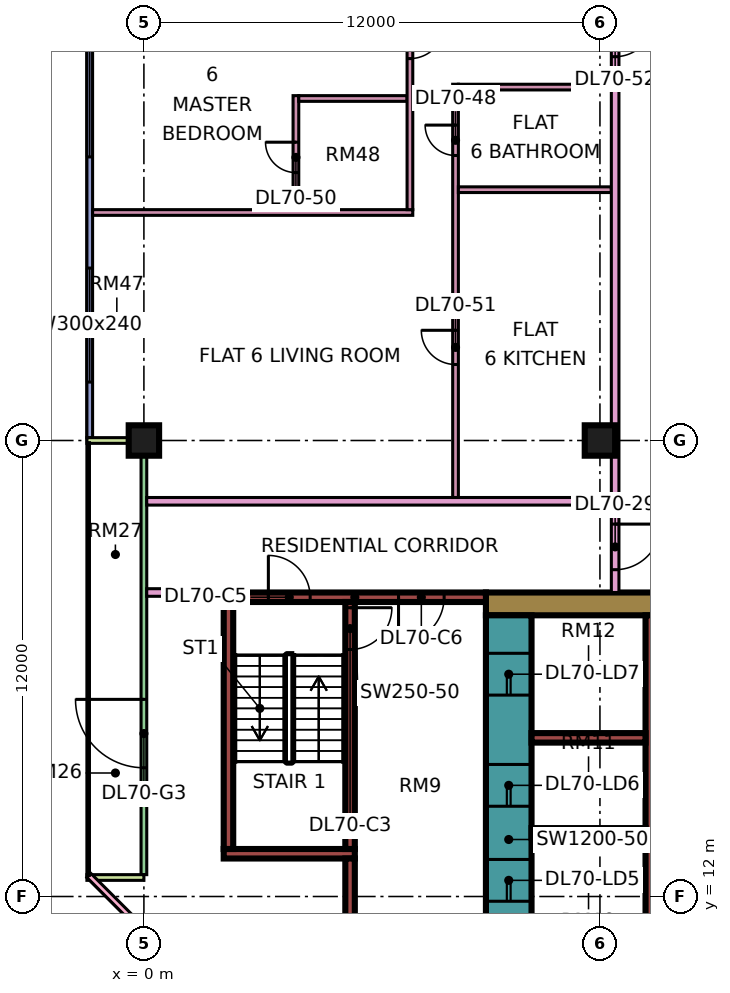
"""IFC4 building model, lengths in metres.
Left out: names, types, materials, properties, quantities, classifications, styles, units other than length and angle.
Written with IfcOpenShell. Run it as: python <this file> out.ifc"""

import sys

from ifc_helpers import new_model, si_unit, direction, frame, frame_2d, origin, origin_2d, place, context, subcontext, project, spatial, rectangle, extrude, element, fill, save


model = new_model("IFC4")
c1 = context("Model", 3, precision=1e-05, world=origin(), true_north=direction((0.0, 1.0)))
c2 = subcontext(c1, "Body", "Model", "MODEL_VIEW")
j1 = project(units=[si_unit("LENGTHUNIT", "METRE"), si_unit("PLANEANGLEUNIT", "RADIAN")], contexts=[c1])
p1 = place(None, origin())
s1 = spatial("IfcSite", under=j1, at=p1, CompositionType="ELEMENT")
p2 = place(p1, origin())
s2 = spatial("IfcBuilding", under=s1, at=p2, CompositionType="ELEMENT")
p3 = place(p2, frame((0.0, 0.0, 299.65)))
s3 = spatial("IfcBuildingStorey", under=s2, at=p3, CompositionType="ELEMENT", Elevation=299.65)
for number, where, z_axis, x_axis in (
    (1, (0.0, 24.0, 0.0), (0.0, 0.0, 1.0), (1.0, 0.0, 0.0)),
    (2, (12.0, 24.0, 0.0), (0.0, 0.0, 1.0), (1.0, 0.0, 0.0)),
):
    element("IfcColumn", number, at=place(p3, frame(where, z_axis=z_axis, x_axis=x_axis)), inside=s3, PredefinedType="COLUMN", context=c2, shape_type="SweptSolid", body=[
        extrude(rectangle(XDim=0.8, YDim=0.8, at=origin_2d()), origin(), (0.0, 0.0, 1.0), 3.75),
    ])
p4 = place(p3, frame((9.0, 19.7, 0.0), z_axis=(0.0, 0.0, 1.0), x_axis=(1.0, 0.0, 0.0)))
e3 = element("IfcWall", 3, at=p4, inside=s3, PredefinedType="SHEAR", context=c2, shape_type="SweptSolid", body=[
    extrude(rectangle(XDim=25.0, YDim=0.6, at=frame_2d((12.5, 0.0))), origin(), (0.0, 0.0, 1.0), 3.75),
])
p5 = place(p4, frame((19.1, 0.0, 0.0)))
e4 = element("IfcOpeningElement", 4, at=p5, cuts=e3, PredefinedType="OPENING", context=c2, shape_type="SweptSolid", body=[
    extrude(rectangle(XDim=1.8, YDim=2.4, at=frame_2d((0.9, 1.2))), frame((0.0, 0.31, 0.0), z_axis=(0.0, -1.0, 0.0), x_axis=(1.0, 0.0, 0.0)), (0.0, 0.0, 1.0), 0.62),
])
p6 = place(p3, frame((9.6, 7.6, 0.0), z_axis=(0.0, 0.0, 1.0), x_axis=(0.0, 1.0, 0.0)))
e5 = element("IfcWall", 5, at=p6, inside=s3, PredefinedType="SHEAR", context=c2, shape_type="SweptSolid", body=[
    extrude(rectangle(XDim=11.8, YDim=1.2, at=frame_2d((5.9, 0.0))), origin(), (0.0, 0.0, 1.0), 3.75),
])
p7 = place(p6, frame((4.275, 0.0, 0.0)))
e6 = element("IfcOpeningElement", 6, at=p7, cuts=e5, PredefinedType="OPENING", context=c2, shape_type="SweptSolid", body=[
    extrude(rectangle(XDim=1.1, YDim=2.2, at=frame_2d((0.55, 1.1))), frame((0.0, 0.61, 0.0), z_axis=(0.0, -1.0, 0.0), x_axis=(1.0, 0.0, 0.0)), (0.0, 0.0, 1.0), 1.22),
])
p8 = place(p6, frame((6.775, 0.0, 0.0)))
e7 = element("IfcOpeningElement", 7, at=p8, cuts=e5, PredefinedType="OPENING", context=c2, shape_type="SweptSolid", body=[
    extrude(rectangle(XDim=1.1, YDim=2.2, at=frame_2d((0.55, 1.1))), frame((0.0, 0.61, 0.0), z_axis=(0.0, -1.0, 0.0), x_axis=(1.0, 0.0, 0.0)), (0.0, 0.0, 1.0), 1.22),
])
p9 = place(p6, frame((9.7, 0.0, 0.0)))
e8 = element("IfcOpeningElement", 8, at=p9, cuts=e5, PredefinedType="OPENING", context=c2, shape_type="SweptSolid", body=[
    extrude(rectangle(XDim=1.1, YDim=2.2, at=frame_2d((0.55, 1.1))), frame((0.0, 0.61, 0.0), z_axis=(0.0, -1.0, 0.0), x_axis=(1.0, 0.0, 0.0)), (0.0, 0.0, 1.0), 1.22),
])
p10 = place(p6, frame((1.95, 0.0, 0.0)))
e9 = element("IfcOpeningElement", 9, at=p10, cuts=e5, PredefinedType="OPENING", context=c2, shape_type="SweptSolid", body=[
    extrude(rectangle(XDim=0.9, YDim=2.1, at=frame_2d((0.45, 1.05))), frame((0.0, 0.61, 0.0), z_axis=(0.0, -1.0, 0.0), x_axis=(1.0, 0.0, 0.0)), (0.0, 0.0, 1.0), 1.22),
])
p11 = place(p3, frame((13.325, 7.6, 0.0), z_axis=(0.0, 0.0, 1.0), x_axis=(0.0, 1.0, 0.0)))
e10 = element("IfcWall", 10, at=p11, inside=s3, PredefinedType="SHEAR", context=c2, shape_type="SweptSolid", body=[
    extrude(rectangle(XDim=11.8, YDim=0.25, at=frame_2d((5.9, 0.0))), origin(), (0.0, 0.0, 1.0), 3.75),
])
for number, where, z_axis, x_axis in (
    (11, (10.2, 13.675, 0.0), (0.0, 0.0, 1.0), (1.0, 0.0, 0.0)),
    (12, (10.2, 16.175, 0.0), (0.0, 0.0, 1.0), (1.0, 0.0, 0.0)),
):
    element("IfcWall", number, at=place(p3, frame(where, z_axis=z_axis, x_axis=x_axis)), inside=s3, PredefinedType="SHEAR", context=c2, shape_type="SweptSolid", body=[
        extrude(rectangle(XDim=3.0, YDim=0.25, at=frame_2d((1.5, 0.0))), origin(), (0.0, 0.0, 1.0), 3.75),
    ])
p12 = place(p3, frame((2.1, 19.875, 0.0), z_axis=(0.0, 0.0, 1.0), x_axis=(1.0, 0.0, 0.0)))
e13 = element("IfcWall", 13, at=p12, inside=s3, PredefinedType="SHEAR", context=c2, shape_type="SweptSolid", body=[
    extrude(rectangle(XDim=6.9, YDim=0.25, at=frame_2d((3.45, 0.0))), origin(), (0.0, 0.0, 1.0), 3.75),
])
p13 = place(p12, frame((1.175, 0.0, 0.0)))
e14 = element("IfcOpeningElement", 14, at=p13, cuts=e13, PredefinedType="OPENING", context=c2, shape_type="SweptSolid", body=[
    extrude(rectangle(XDim=1.1, YDim=2.2, at=frame_2d((0.55, 1.1))), frame((0.0, 0.135, 0.0), z_axis=(0.0, -1.0, 0.0), x_axis=(1.0, 0.0, 0.0)), (0.0, 0.0, 1.0), 0.27),
])
p14 = place(p12, frame((4.6, 0.0, 0.0)))
e15 = element("IfcOpeningElement", 15, at=p14, cuts=e13, PredefinedType="OPENING", context=c2, shape_type="SweptSolid", body=[
    extrude(rectangle(XDim=1.2, YDim=2.2, at=frame_2d((0.6, 1.1))), frame((0.0, 0.135, 0.0), z_axis=(0.0, -1.0, 0.0), x_axis=(1.0, 0.0, 0.0)), (0.0, 0.0, 1.0), 0.27),
])
p15 = place(p3, frame((2.1, 13.125, 0.0), z_axis=(0.0, 0.0, 1.0), x_axis=(1.0, 0.0, 0.0)))
e16 = element("IfcWall", 16, at=p15, inside=s3, PredefinedType="SHEAR", context=c2, shape_type="SweptSolid", body=[
    extrude(rectangle(XDim=3.45, YDim=0.25, at=frame_2d((1.725, 0.0))), origin(), (0.0, 0.0, 1.0), 3.75),
])
p16 = place(p3, frame((2.225, 13.25, 0.0), z_axis=(0.0, 0.0, 1.0), x_axis=(0.0, 1.0, 0.0)))
e17 = element("IfcWall", 17, at=p16, inside=s3, PredefinedType="SHEAR", context=c2, shape_type="SweptSolid", body=[
    extrude(rectangle(XDim=6.5, YDim=0.25, at=frame_2d((3.25, 0.0))), origin(), (0.0, 0.0, 1.0), 3.75),
])
p17 = place(p3, frame((5.425, 13.25, 0.0), z_axis=(0.0, 0.0, 1.0), x_axis=(0.0, 1.0, 0.0)))
e18 = element("IfcWall", 18, at=p17, inside=s3, PredefinedType="SHEAR", context=c2, shape_type="SweptSolid", body=[
    extrude(rectangle(XDim=6.5, YDim=0.25, at=frame_2d((3.25, 0.0))), origin(), (0.0, 0.0, 1.0), 3.75),
])
p18 = place(p17, frame((5.25, 0.0, 0.0)))
e19 = element("IfcOpeningElement", 19, at=p18, cuts=e18, PredefinedType="OPENING", context=c2, shape_type="SweptSolid", body=[
    extrude(rectangle(XDim=1.1, YDim=2.2, at=frame_2d((0.55, 1.1))), frame((0.0, 0.135, 0.0), z_axis=(0.0, -1.0, 0.0), x_axis=(1.0, 0.0, 0.0)), (0.0, 0.0, 1.0), 0.27),
])
p19 = place(p3, frame((5.425, 9.0, 0.0), z_axis=(0.0, 0.0, 1.0), x_axis=(0.0, 1.0, 0.0)))
e20 = element("IfcWall", 20, at=p19, inside=s3, PredefinedType="SHEAR", context=c2, shape_type="SweptSolid", body=[
    extrude(rectangle(XDim=4.0, YDim=0.25, at=frame_2d((2.0, 0.0))), origin(), (0.0, 0.0, 1.0), 3.75),
])
p20 = place(p3, frame((-1.425, 35.925, 0.0), z_axis=(0.0, 0.0, 1.0), x_axis=(0.0, -1.0, 0.0)))
e21 = element("IfcWall", 21, at=p20, inside=s3, PredefinedType="SOLIDWALL", context=c2, shape_type="SweptSolid", body=[
    extrude(rectangle(XDim=11.85, YDim=0.15, at=frame_2d((5.925, 0.0))), origin(), (0.0, 0.0, 1.0), 3.35),
])
p21 = place(p20, frame((1.462, 0.0, 0.45)))
e22 = element("IfcOpeningElement", 22, at=p21, cuts=e21, PredefinedType="OPENING", context=c2, shape_type="SweptSolid", body=[
    extrude(rectangle(XDim=3.0, YDim=2.4, at=frame_2d((1.5, 1.2))), frame((0.0, 0.085, 0.0), z_axis=(0.0, -1.0, 0.0), x_axis=(1.0, 0.0, 0.0)), (0.0, 0.0, 1.0), 0.17),
])
p22 = place(p20, frame((7.387, 0.0, 0.45)))
e23 = element("IfcOpeningElement", 23, at=p22, cuts=e21, PredefinedType="OPENING", context=c2, shape_type="SweptSolid", body=[
    extrude(rectangle(XDim=3.0, YDim=2.4, at=frame_2d((1.5, 1.2))), frame((0.0, 0.085, 0.0), z_axis=(0.0, -1.0, 0.0), x_axis=(1.0, 0.0, 0.0)), (0.0, 0.0, 1.0), 0.17),
])
p23 = place(p3, frame((0.0, 23.925, 0.0), z_axis=(0.0, 0.0, 1.0), x_axis=(0.0, -1.0, 0.0)))
e24 = element("IfcWall", 24, at=p23, inside=s3, PredefinedType="SOLIDWALL", context=c2, shape_type="SweptSolid", body=[
    extrude(rectangle(XDim=11.35, YDim=0.15, at=frame_2d((5.675, 0.0))), origin(), (0.0, 0.0, 1.0), 3.35),
])
p24 = place(p23, frame((6.738, 0.0, 0.0)))
e25 = element("IfcOpeningElement", 25, at=p24, cuts=e24, PredefinedType="OPENING", context=c2, shape_type="SweptSolid", body=[
    extrude(rectangle(XDim=1.8, YDim=2.4, at=frame_2d((0.9, 1.2))), frame((0.0, 0.085, 0.0), z_axis=(0.0, -1.0, 0.0), x_axis=(1.0, 0.0, 0.0)), (0.0, 0.0, 1.0), 0.17),
])
for number, where, z_axis, x_axis in (
    (26, (-1.5, 24.0, 0.0), (0.0, 0.0, 1.0), (1.0, 0.0, 0.0)),
    (27, (-1.5, 12.5, 0.0), (0.0, 0.0, 1.0), (1.0, 0.0, 0.0)),
):
    element("IfcWall", number, at=place(p3, frame(where, z_axis=z_axis, x_axis=x_axis)), inside=s3, PredefinedType="SOLIDWALL", context=c2, shape_type="SweptSolid", body=[
        extrude(rectangle(XDim=1.5, YDim=0.15, at=frame_2d((0.75, 0.0))), origin(), (0.0, 0.0, 1.0), 3.35),
    ])
p25 = place(p3, frame((-1.447, 12.553, 0.0), z_axis=(0.0, 0.0, 1.0), x_axis=(0.707106781187, -0.707106781187, 0.0)))
e28 = element("IfcWall", 28, at=p25, inside=s3, PredefinedType="SOLIDWALL", context=c2, shape_type="SweptSolid", body=[
    extrude(rectangle(XDim=19.799, YDim=0.15, at=frame_2d((9.899, 0.0))), origin(), (0.0, 0.0, 1.0), 3.35),
])
p26 = place(p25, frame((2.212, 0.0, 0.45)))
e29 = element("IfcOpeningElement", 29, at=p26, cuts=e28, PredefinedType="OPENING", context=c2, shape_type="SweptSolid", body=[
    extrude(rectangle(XDim=3.0, YDim=2.4, at=frame_2d((1.5, 1.2))), frame((0.0, 0.085, 0.0), z_axis=(0.0, -1.0, 0.0), x_axis=(1.0, 0.0, 0.0)), (0.0, 0.0, 1.0), 0.17),
])
p27 = place(p25, frame((10.216, 0.0, 0.45)))
e30 = element("IfcOpeningElement", 30, at=p27, cuts=e28, PredefinedType="OPENING", context=c2, shape_type="SweptSolid", body=[
    extrude(rectangle(XDim=3.0, YDim=2.4, at=frame_2d((1.5, 1.2))), frame((0.0, 0.085, 0.0), z_axis=(0.0, -1.0, 0.0), x_axis=(1.0, 0.0, 0.0)), (0.0, 0.0, 1.0), 0.17),
])
p28 = place(p3, frame((-1.35, 30.0, 0.0), z_axis=(0.0, 0.0, 1.0), x_axis=(1.0, 0.0, 0.0)))
e31 = element("IfcWall", 31, at=p28, inside=s3, PredefinedType="PARTITIONING", context=c2, shape_type="SweptSolid", body=[
    extrude(rectangle(XDim=8.425, YDim=0.15, at=frame_2d((4.212, 0.0))), origin(), (0.0, 0.0, 1.0), 3.35),
])
p29 = place(p3, frame((0.074, 20.0, 0.0), z_axis=(0.0, 0.0, 1.0), x_axis=(1.0, 0.0, 0.0)))
e32 = element("IfcWall", 32, at=p29, inside=s3, PredefinedType="PARTITIONING", context=c2, shape_type="SweptSolid", body=[
    extrude(rectangle(XDim=2.026, YDim=0.2, at=frame_2d((1.013, 0.0))), origin(), (0.0, 0.0, 1.0), 3.35),
])
p30 = place(p3, frame((0.074, 22.4, 0.0), z_axis=(0.0, 0.0, 1.0), x_axis=(1.0, 0.0, 0.0)))
e33 = element("IfcWall", 33, at=p30, inside=s3, PredefinedType="PARTITIONING", context=c2, shape_type="SweptSolid", body=[
    extrude(rectangle(XDim=12.226, YDim=0.2, at=frame_2d((6.113, 0.0))), origin(), (0.0, 0.0, 1.0), 3.35),
])
p31 = place(p3, frame((4.0, 30.075, 0.0), z_axis=(0.0, 0.0, 1.0), x_axis=(0.0, 1.0, 0.0)))
e34 = element("IfcWall", 34, at=p31, inside=s3, PredefinedType="PARTITIONING", context=c2, shape_type="SweptSolid", body=[
    extrude(rectangle(XDim=3.0, YDim=0.15, at=frame_2d((1.5, 0.0))), origin(), (0.0, 0.0, 1.0), 3.35),
])
p32 = place(p31, frame((0.975, 0.0, 0.0)))
e35 = element("IfcOpeningElement", 35, at=p32, cuts=e34, PredefinedType="OPENING", context=c2, shape_type="SweptSolid", body=[
    extrude(rectangle(XDim=0.8, YDim=2.1, at=frame_2d((0.4, 1.05))), frame((0.0, 0.085, 0.0), z_axis=(0.0, -1.0, 0.0), x_axis=(1.0, 0.0, 0.0)), (0.0, 0.0, 1.0), 0.17),
])
p33 = place(p3, frame((4.075, 33.0, 0.0), z_axis=(0.0, 0.0, 1.0), x_axis=(1.0, 0.0, 0.0)))
e36 = element("IfcWall", 36, at=p33, inside=s3, PredefinedType="PARTITIONING", context=c2, shape_type="SweptSolid", body=[
    extrude(rectangle(XDim=2.85, YDim=0.15, at=frame_2d((1.425, 0.0))), origin(), (0.0, 0.0, 1.0), 3.35),
])
p34 = place(p3, frame((7.0, 30.075, 0.0), z_axis=(0.0, 0.0, 1.0), x_axis=(0.0, 1.0, 0.0)))
e37 = element("IfcWall", 37, at=p34, inside=s3, PredefinedType="PARTITIONING", context=c2, shape_type="SweptSolid", body=[
    extrude(rectangle(XDim=5.825, YDim=0.15, at=frame_2d((2.913, 0.0))), origin(), (0.0, 0.0, 1.0), 3.35),
])
p35 = place(p34, frame((3.975, 0.0, 0.0)))
e38 = element("IfcOpeningElement", 38, at=p35, cuts=e37, PredefinedType="OPENING", context=c2, shape_type="SweptSolid", body=[
    extrude(rectangle(XDim=0.9, YDim=2.1, at=frame_2d((0.45, 1.05))), frame((0.0, 0.085, 0.0), z_axis=(0.0, -1.0, 0.0), x_axis=(1.0, 0.0, 0.0)), (0.0, 0.0, 1.0), 0.17),
])
p36 = place(p3, frame((8.2, 22.5, 0.0), z_axis=(0.0, 0.0, 1.0), x_axis=(0.0, 1.0, 0.0)))
e39 = element("IfcWall", 39, at=p36, inside=s3, PredefinedType="PARTITIONING", context=c2, shape_type="SweptSolid", body=[
    extrude(rectangle(XDim=10.875, YDim=0.15, at=frame_2d((5.438, 0.0))), origin(), (0.0, 0.0, 1.0), 3.35),
])
p37 = place(p36, frame((9.0, 0.0, 0.0)))
e40 = element("IfcOpeningElement", 40, at=p37, cuts=e39, PredefinedType="OPENING", context=c2, shape_type="SweptSolid", body=[
    extrude(rectangle(XDim=0.8, YDim=2.1, at=frame_2d((0.4, 1.05))), frame((0.0, 0.085, 0.0), z_axis=(0.0, -1.0, 0.0), x_axis=(1.0, 0.0, 0.0)), (0.0, 0.0, 1.0), 0.17),
])
p38 = place(p36, frame((3.5, 0.0, 0.0)))
e41 = element("IfcOpeningElement", 41, at=p38, cuts=e39, PredefinedType="OPENING", context=c2, shape_type="SweptSolid", body=[
    extrude(rectangle(XDim=0.9, YDim=2.1, at=frame_2d((0.45, 1.05))), frame((0.0, 0.085, 0.0), z_axis=(0.0, -1.0, 0.0), x_axis=(1.0, 0.0, 0.0)), (0.0, 0.0, 1.0), 0.17),
])
for number, where, z_axis, x_axis in (
    (42, (8.275, 30.6, 0.0), (0.0, 0.0, 1.0), (1.0, 0.0, 0.0)),
    (43, (8.275, 33.3, 0.0), (0.0, 0.0, 1.0), (1.0, 0.0, 0.0)),
):
    element("IfcWall", number, at=place(p3, frame(where, z_axis=z_axis, x_axis=x_axis)), inside=s3, PredefinedType="PARTITIONING", context=c2, shape_type="SweptSolid", body=[
        extrude(rectangle(XDim=4.025, YDim=0.15, at=frame_2d((2.013, 0.0))), origin(), (0.0, 0.0, 1.0), 3.35),
    ])
p39 = place(p3, frame((12.4, 20.0, 0.0), z_axis=(0.0, 0.0, 1.0), x_axis=(0.0, 1.0, 0.0)))
e44 = element("IfcWall", 44, at=p39, inside=s3, PredefinedType="PARTITIONING", context=c2, shape_type="SweptSolid", body=[
    extrude(rectangle(XDim=33.926, YDim=0.2, at=frame_2d((16.963, 0.0))), origin(), (0.0, 0.0, 1.0), 3.35),
])
p40 = place(p39, frame((32.1, 0.0, 0.0)))
e45 = element("IfcOpeningElement", 45, at=p40, cuts=e44, PredefinedType="OPENING", context=c2, shape_type="SweptSolid", body=[
    extrude(rectangle(XDim=1.0, YDim=2.1, at=frame_2d((0.5, 1.05))), frame((0.0, 0.11, 0.0), z_axis=(0.0, -1.0, 0.0), x_axis=(1.0, 0.0, 0.0)), (0.0, 0.0, 1.0), 0.22),
])
p41 = place(p39, frame((0.6, 0.0, 0.0)))
e46 = element("IfcOpeningElement", 46, at=p41, cuts=e44, PredefinedType="OPENING", context=c2, shape_type="SweptSolid", body=[
    extrude(rectangle(XDim=1.2, YDim=2.1, at=frame_2d((0.6, 1.05))), frame((0.0, 0.11, 0.0), z_axis=(0.0, -1.0, 0.0), x_axis=(1.0, 0.0, 0.0)), (0.0, 0.0, 1.0), 0.22),
])
p42 = place(p39, frame((14.1, 0.0, 0.0)))
e47 = element("IfcOpeningElement", 47, at=p42, cuts=e44, PredefinedType="OPENING", context=c2, shape_type="SweptSolid", body=[
    extrude(rectangle(XDim=1.0, YDim=2.1, at=frame_2d((0.5, 1.05))), frame((0.0, 0.11, 0.0), z_axis=(0.0, -1.0, 0.0), x_axis=(1.0, 0.0, 0.0)), (0.0, 0.0, 1.0), 0.22),
])
p43 = place(p21, origin())
e48 = element("IfcWindow", 48, at=p43, inside=s3, PartitioningType="SINGLE_PANEL", PredefinedType="WINDOW", context=c2, shape_type="SweptSolid", body=[
    extrude(rectangle(XDim=3.0, YDim=2.4, at=frame_2d((1.5, 1.2))), frame((0.0, 0.03, 0.0), z_axis=(0.0, -1.0, 0.0), x_axis=(1.0, 0.0, 0.0)), (0.0, 0.0, 1.0), 0.06),
])
fill(e22, e48)
p44 = place(p22, origin())
e49 = element("IfcWindow", 49, at=p44, inside=s3, PartitioningType="SINGLE_PANEL", PredefinedType="WINDOW", context=c2, shape_type="SweptSolid", body=[
    extrude(rectangle(XDim=3.0, YDim=2.4, at=frame_2d((1.5, 1.2))), frame((0.0, 0.03, 0.0), z_axis=(0.0, -1.0, 0.0), x_axis=(1.0, 0.0, 0.0)), (0.0, 0.0, 1.0), 0.06),
])
fill(e23, e49)
p45 = place(p24, frame((1.8, 0.0, 0.0), z_axis=(0.0, 0.0, 1.0), x_axis=(-1.0, 0.0, 0.0)))
e50 = element("IfcDoor", 50, at=p45, inside=s3, OperationType="DOUBLE_DOOR_SINGLE_SWING", PredefinedType="DOOR", context=c2, shape_type="SweptSolid", body=[
    extrude(rectangle(XDim=1.8, YDim=2.4, at=frame_2d((0.9, 1.2))), frame((0.0, 0.025, 0.0), z_axis=(0.0, -1.0, 0.0), x_axis=(1.0, 0.0, 0.0)), (0.0, 0.0, 1.0), 0.05),
])
fill(e25, e50)
p46 = place(p7, origin())
e51 = element("IfcDoor", 51, at=p46, inside=s3, OperationType="DOUBLE_DOOR_SLIDING", PredefinedType="DOOR", context=c2, shape_type="SweptSolid", body=[
    extrude(rectangle(XDim=1.1, YDim=2.2, at=frame_2d((0.55, 1.1))), frame((0.0, 0.025, 0.0), z_axis=(0.0, -1.0, 0.0), x_axis=(1.0, 0.0, 0.0)), (0.0, 0.0, 1.0), 0.05),
])
fill(e6, e51)
p47 = place(p8, origin())
e52 = element("IfcDoor", 52, at=p47, inside=s3, OperationType="DOUBLE_DOOR_SLIDING", PredefinedType="DOOR", context=c2, shape_type="SweptSolid", body=[
    extrude(rectangle(XDim=1.1, YDim=2.2, at=frame_2d((0.55, 1.1))), frame((0.0, 0.025, 0.0), z_axis=(0.0, -1.0, 0.0), x_axis=(1.0, 0.0, 0.0)), (0.0, 0.0, 1.0), 0.05),
])
fill(e7, e52)
p48 = place(p9, origin())
e53 = element("IfcDoor", 53, at=p48, inside=s3, OperationType="DOUBLE_DOOR_SLIDING", PredefinedType="DOOR", context=c2, shape_type="SweptSolid", body=[
    extrude(rectangle(XDim=1.1, YDim=2.2, at=frame_2d((0.55, 1.1))), frame((0.0, 0.025, 0.0), z_axis=(0.0, -1.0, 0.0), x_axis=(1.0, 0.0, 0.0)), (0.0, 0.0, 1.0), 0.05),
])
fill(e8, e53)
p49 = place(p18, origin())
e54 = element("IfcDoor", 54, at=p49, inside=s3, OperationType="SINGLE_SWING_RIGHT", PredefinedType="DOOR", context=c2, shape_type="SweptSolid", body=[
    extrude(rectangle(XDim=1.1, YDim=2.2, at=frame_2d((0.55, 1.1))), frame((0.0, 0.025, 0.0), z_axis=(0.0, -1.0, 0.0), x_axis=(1.0, 0.0, 0.0)), (0.0, 0.0, 1.0), 0.05),
])
fill(e19, e54)
p50 = place(p13, origin())
e55 = element("IfcDoor", 55, at=p50, inside=s3, OperationType="SINGLE_SWING_LEFT", PredefinedType="DOOR", context=c2, shape_type="SweptSolid", body=[
    extrude(rectangle(XDim=1.1, YDim=2.2, at=frame_2d((0.55, 1.1))), frame((0.0, 0.025, 0.0), z_axis=(0.0, -1.0, 0.0), x_axis=(1.0, 0.0, 0.0)), (0.0, 0.0, 1.0), 0.05),
])
fill(e14, e55)
p51 = place(p14, frame((1.2, 0.0, 0.0), z_axis=(0.0, 0.0, 1.0), x_axis=(-1.0, 0.0, 0.0)))
e56 = element("IfcDoor", 56, at=p51, inside=s3, OperationType="SINGLE_SWING_LEFT", PredefinedType="DOOR", context=c2, shape_type="SweptSolid", body=[
    extrude(rectangle(XDim=1.2, YDim=2.2, at=frame_2d((0.6, 1.1))), frame((0.0, 0.025, 0.0), z_axis=(0.0, -1.0, 0.0), x_axis=(1.0, 0.0, 0.0)), (0.0, 0.0, 1.0), 0.05),
])
fill(e15, e56)
p52 = place(p41, origin())
e57 = element("IfcDoor", 57, at=p52, inside=s3, OperationType="SINGLE_SWING_RIGHT", PredefinedType="DOOR", context=c2, shape_type="SweptSolid", body=[
    extrude(rectangle(XDim=1.2, YDim=2.1, at=frame_2d((0.6, 1.05))), frame((0.0, 0.025, 0.0), z_axis=(0.0, -1.0, 0.0), x_axis=(1.0, 0.0, 0.0)), (0.0, 0.0, 1.0), 0.05),
])
fill(e46, e57)
p53 = place(p37, frame((0.8, 0.0, 0.0), z_axis=(0.0, 0.0, 1.0), x_axis=(-1.0, 0.0, 0.0)))
e58 = element("IfcDoor", 58, at=p53, inside=s3, OperationType="SINGLE_SWING_RIGHT", PredefinedType="DOOR", context=c2, shape_type="SweptSolid", body=[
    extrude(rectangle(XDim=0.8, YDim=2.1, at=frame_2d((0.4, 1.05))), frame((0.0, 0.025, 0.0), z_axis=(0.0, -1.0, 0.0), x_axis=(1.0, 0.0, 0.0)), (0.0, 0.0, 1.0), 0.05),
])
fill(e40, e58)
p54 = place(p35, origin())
e59 = element("IfcDoor", 59, at=p54, inside=s3, OperationType="SINGLE_SWING_RIGHT", PredefinedType="DOOR", context=c2, shape_type="SweptSolid", body=[
    extrude(rectangle(XDim=0.9, YDim=2.1, at=frame_2d((0.45, 1.05))), frame((0.0, 0.025, 0.0), z_axis=(0.0, -1.0, 0.0), x_axis=(1.0, 0.0, 0.0)), (0.0, 0.0, 1.0), 0.05),
])
fill(e38, e59)
p55 = place(p32, frame((0.8, 0.0, 0.0), z_axis=(0.0, 0.0, 1.0), x_axis=(-1.0, 0.0, 0.0)))
e60 = element("IfcDoor", 60, at=p55, inside=s3, OperationType="SINGLE_SWING_RIGHT", PredefinedType="DOOR", context=c2, shape_type="SweptSolid", body=[
    extrude(rectangle(XDim=0.8, YDim=2.1, at=frame_2d((0.4, 1.05))), frame((0.0, 0.025, 0.0), z_axis=(0.0, -1.0, 0.0), x_axis=(1.0, 0.0, 0.0)), (0.0, 0.0, 1.0), 0.05),
])
fill(e35, e60)
p56 = place(p38, frame((0.9, 0.0, 0.0), z_axis=(0.0, 0.0, 1.0), x_axis=(-1.0, 0.0, 0.0)))
e61 = element("IfcDoor", 61, at=p56, inside=s3, OperationType="SINGLE_SWING_RIGHT", PredefinedType="DOOR", context=c2, shape_type="SweptSolid", body=[
    extrude(rectangle(XDim=0.9, YDim=2.1, at=frame_2d((0.45, 1.05))), frame((0.0, 0.025, 0.0), z_axis=(0.0, -1.0, 0.0), x_axis=(1.0, 0.0, 0.0)), (0.0, 0.0, 1.0), 0.05),
])
fill(e41, e61)
p57 = place(p42, origin())
e62 = element("IfcDoor", 62, at=p57, inside=s3, OperationType="SINGLE_SWING_RIGHT", PredefinedType="DOOR", context=c2, shape_type="SweptSolid", body=[
    extrude(rectangle(XDim=1.0, YDim=2.1, at=frame_2d((0.5, 1.05))), frame((0.0, 0.025, 0.0), z_axis=(0.0, -1.0, 0.0), x_axis=(1.0, 0.0, 0.0)), (0.0, 0.0, 1.0), 0.05),
])
fill(e47, e62)
save(model, sys.argv[1])
